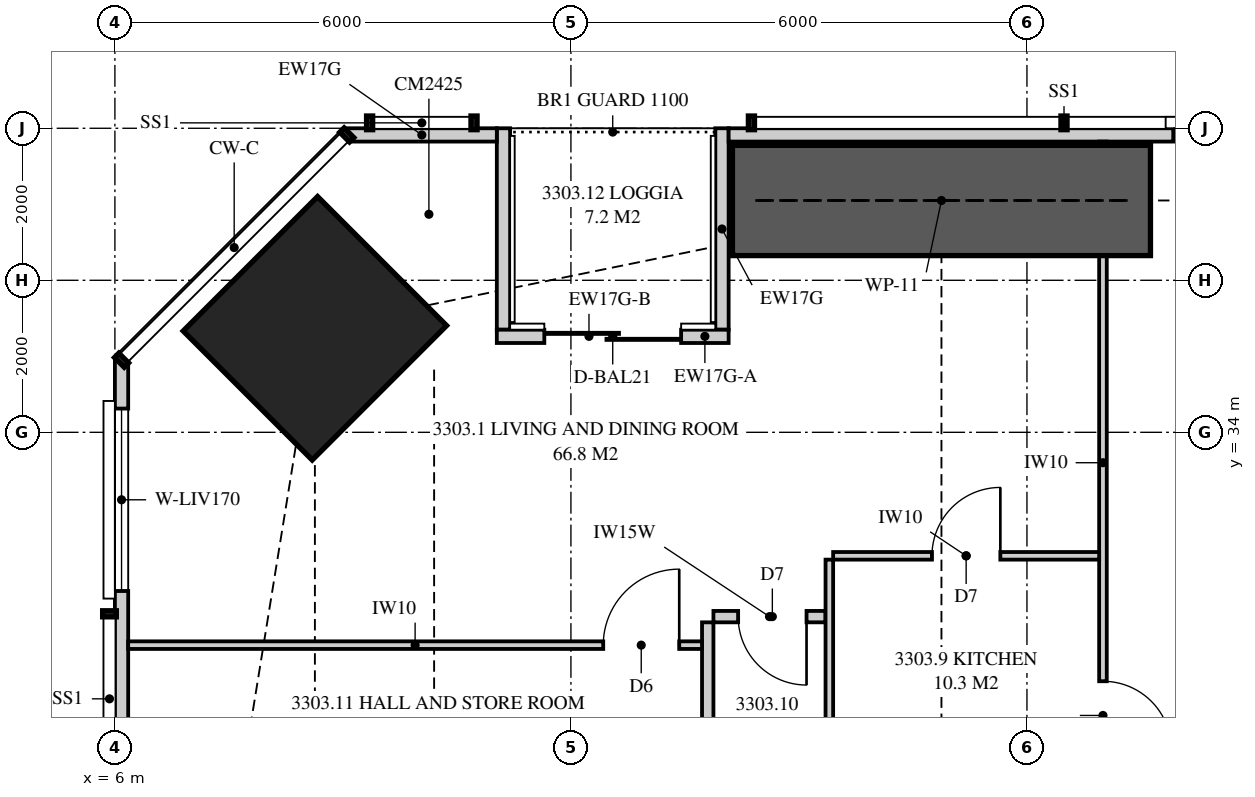
"""IFC4 building model, lengths in metres.
Left out: names, types, materials, properties, quantities, classifications, styles, units other than length and angle.
Written with IfcOpenShell. Run it as: python <this file> out.ifc"""

import sys

from ifc_helpers import new_model, si_unit, direction, frame, frame_2d, origin, origin_2d, place, context, subcontext, project, spatial, polyline, rectangle, outline, extrude, element, fill, save


model = new_model("IFC4")
c1 = context("Model", 3, precision=1e-05, world=origin(), true_north=direction((0.0, 1.0)))
c2 = subcontext(c1, "Body", "Model", "MODEL_VIEW")
j1 = project(units=[si_unit("LENGTHUNIT", "METRE"), si_unit("PLANEANGLEUNIT", "RADIAN")], contexts=[c1])
p1 = place(None, origin())
s1 = spatial("IfcSite", under=j1, at=p1, CompositionType="ELEMENT")
p2 = place(p1, origin())
s2 = spatial("IfcBuilding", under=s1, at=p2, CompositionType="ELEMENT")
p3 = place(p2, frame((0.0, 0.0, 121.6)))
s3 = spatial("IfcBuildingStorey", under=s2, at=p3, CompositionType="ELEMENT", Elevation=121.6)
p4 = place(p3, frame((8.631, 35.369, 0.0), z_axis=(0.0, 0.0, 1.0), x_axis=(0.707106781187, -0.707106781187, 0.0)))
e1 = element("IfcColumn", 1, at=p4, inside=s3, PredefinedType="COLUMN", context=c2, shape_type="SweptSolid", body=[
    extrude(rectangle(XDim=2.4, YDim=2.5, at=origin_2d()), origin(), (0.0, 0.0, 1.0), 3.35),
])
p5 = place(p3, frame((41.449, 37.913, 0.0), z_axis=(0.0, 0.0, 1.0), x_axis=(-1.0, 0.0, 0.0)))
e2 = element("IfcWall", 2, at=p5, inside=s3, PredefinedType="SOLIDWALL", context=c2, shape_type="SweptSolid", body=[
    extrude(outline(polyline([(0.0, 0.0), (27.374, 0.0), (27.374, 3.11), (24.777, 3.11), (24.777, 2.15), (24.732, 2.15), (24.732, 3.11), (24.574, 3.11), (24.574, 2.15), (2.824, 2.15), (2.824, 3.11), (2.666, 3.11), (2.666, 2.15), (2.62, 2.15), (2.62, 3.11), (0.0, 3.11), (0.0, 0.0)])), frame((0.0, 0.087, 0.0), z_axis=(0.0, -1.0, 0.0), x_axis=(1.0, 0.0, 0.0)), (0.0, 0.0, 1.0), 0.175),
])
p6 = place(p5, frame((5.699, 0.0, 0.4)))
e3 = element("IfcOpeningElement", 3, at=p6, cuts=e2, PredefinedType="OPENING", context=c2, shape_type="SweptSolid", body=[
    extrude(rectangle(XDim=1.8, YDim=1.7, at=frame_2d((0.9, 0.85))), frame((0.0, 0.097, 0.0), z_axis=(0.0, -1.0, 0.0), x_axis=(1.0, 0.0, 0.0)), (0.0, 0.0, 1.0), 0.195),
])
p7 = place(p5, frame((9.034, 0.0, 0.4)))
e4 = element("IfcOpeningElement", 4, at=p7, cuts=e2, PredefinedType="OPENING", context=c2, shape_type="SweptSolid", body=[
    extrude(rectangle(XDim=1.8, YDim=1.7, at=frame_2d((0.9, 0.85))), frame((0.0, 0.097, 0.0), z_axis=(0.0, -1.0, 0.0), x_axis=(1.0, 0.0, 0.0)), (0.0, 0.0, 1.0), 0.195),
])
p8 = place(p5, frame((16.558, 0.0, 0.4)))
e5 = element("IfcOpeningElement", 5, at=p8, cuts=e2, PredefinedType="OPENING", context=c2, shape_type="SweptSolid", body=[
    extrude(rectangle(XDim=1.8, YDim=1.7, at=frame_2d((0.9, 0.85))), frame((0.0, 0.097, 0.0), z_axis=(0.0, -1.0, 0.0), x_axis=(1.0, 0.0, 0.0)), (0.0, 0.0, 1.0), 0.195),
])
p9 = place(p5, frame((19.724, 0.0, 0.4)))
e6 = element("IfcOpeningElement", 6, at=p9, cuts=e2, PredefinedType="OPENING", context=c2, shape_type="SweptSolid", body=[
    extrude(rectangle(XDim=1.8, YDim=1.7, at=frame_2d((0.9, 0.85))), frame((0.0, 0.097, 0.0), z_axis=(0.0, -1.0, 0.0), x_axis=(1.0, 0.0, 0.0)), (0.0, 0.0, 1.0), 0.195),
])
p10 = place(p3, frame((11.025, 37.913, 0.0), z_axis=(0.0, 0.0, 1.0), x_axis=(-1.0, 0.0, 0.0)))
e7 = element("IfcWall", 7, at=p10, inside=s3, PredefinedType="SOLIDWALL", context=c2, shape_type="SweptSolid", body=[
    extrude(rectangle(XDim=1.974, YDim=0.175, at=frame_2d((0.987, 0.0))), origin(), (0.0, 0.0, 1.0), 3.11),
])
p11 = place(p3, frame((14.075, 35.262, 0.0), z_axis=(0.0, 0.0, 1.0), x_axis=(-1.0, 0.0, 0.0)))
e8 = element("IfcWall", 8, at=p11, inside=s3, PredefinedType="SOLIDWALL", context=c2, shape_type="SweptSolid", body=[
    extrude(rectangle(XDim=0.625, YDim=0.175, at=frame_2d((0.312, 0.0))), origin(), (0.0, 0.0, 1.0), 3.11),
])
p12 = place(p3, frame((13.45, 35.262, 0.0), z_axis=(0.0, 0.0, 1.0), x_axis=(-1.0, 0.0, 0.0)))
e9 = element("IfcWall", 9, at=p12, inside=s3, PredefinedType="SOLIDWALL", context=c2, shape_type="SweptSolid", body=[
    extrude(rectangle(XDim=2.425, YDim=0.175, at=frame_2d((1.212, 0.0))), origin(), (0.0, 0.0, 1.0), 2.15),
])
p13 = place(p12, origin())
e10 = element("IfcOpeningElement", 10, at=p13, cuts=e9, PredefinedType="OPENING", context=c2, shape_type="SweptSolid", body=[
    extrude(rectangle(XDim=1.8, YDim=2.1, at=frame_2d((0.9, 1.05))), frame((0.0, 0.097, 0.0), z_axis=(0.0, -1.0, 0.0), x_axis=(1.0, 0.0, 0.0)), (0.0, 0.0, 1.0), 0.195),
])
p14 = place(p3, frame((13.988, 38.0, 0.0), z_axis=(0.0, 0.0, 1.0), x_axis=(0.0, -1.0, 0.0)))
e11 = element("IfcWall", 11, at=p14, inside=s3, PredefinedType="SOLIDWALL", context=c2, shape_type="SweptSolid", body=[
    extrude(outline(polyline([(0.0, 0.0), (2.65, 0.0), (2.65, 3.11), (2.373, 3.11), (2.373, 2.15), (0.705, 2.15), (0.705, 3.11), (0.0, 3.11), (0.0, 0.0)])), frame((0.0, 0.087, 0.0), z_axis=(0.0, -1.0, 0.0), x_axis=(1.0, 0.0, 0.0)), (0.0, 0.0, 1.0), 0.175),
])
p15 = place(p3, frame((11.113, 38.0, 0.0), z_axis=(0.0, 0.0, 1.0), x_axis=(0.0, -1.0, 0.0)))
e12 = element("IfcWall", 12, at=p15, inside=s3, PredefinedType="SOLIDWALL", context=c2, shape_type="SweptSolid", body=[
    extrude(outline(polyline([(0.0, 0.0), (2.65, 0.0), (2.65, 2.15), (1.291, 2.15), (1.291, 3.11), (0.0, 3.11), (0.0, 0.0)])), frame((0.0, 0.087, 0.0), z_axis=(0.0, -1.0, 0.0), x_axis=(1.0, 0.0, 0.0)), (0.0, 0.0, 1.0), 0.175),
])
p16 = place(p3, frame((6.087, 34.949, 0.0), z_axis=(0.0, 0.0, 1.0), x_axis=(0.0, -1.0, 0.0)))
e13 = element("IfcWall", 13, at=p16, inside=s3, PredefinedType="SOLIDWALL", context=c2, shape_type="SweptSolid", body=[
    extrude(outline(polyline([(0.0, 0.0), (14.532, 0.0), (14.532, 2.15), (9.949, 2.15), (9.949, 3.11), (9.823, 3.11), (9.823, 2.15), (9.73, 2.15), (9.73, 3.11), (0.0, 3.11), (0.0, 0.0)])), frame((0.0, 0.087, 0.0), z_axis=(0.0, -1.0, 0.0), x_axis=(1.0, 0.0, 0.0)), (0.0, 0.0, 1.0), 0.175),
])
p17 = place(p16, frame((0.636, 0.0, 0.4)))
e14 = element("IfcOpeningElement", 14, at=p17, cuts=e13, PredefinedType="OPENING", context=c2, shape_type="SweptSolid", body=[
    extrude(rectangle(XDim=2.4, YDim=1.7, at=frame_2d((1.2, 0.85))), frame((0.0, 0.097, 0.0), z_axis=(0.0, -1.0, 0.0), x_axis=(1.0, 0.0, 0.0)), (0.0, 0.0, 1.0), 0.195),
])
p18 = place(p16, frame((5.874, 0.0, 0.4)))
e15 = element("IfcOpeningElement", 15, at=p18, cuts=e13, PredefinedType="OPENING", context=c2, shape_type="SweptSolid", body=[
    extrude(rectangle(XDim=1.2, YDim=1.7, at=frame_2d((0.6, 0.85))), frame((0.0, 0.097, 0.0), z_axis=(0.0, -1.0, 0.0), x_axis=(1.0, 0.0, 0.0)), (0.0, 0.0, 1.0), 0.195),
])
p19 = place(p3, frame((19.0, 37.825, 0.0), z_axis=(0.0, 0.0, 1.0), x_axis=(0.0, -1.0, 0.0)))
e16 = element("IfcWall", 16, at=p19, inside=s3, PredefinedType="PARTITIONING", context=c2, shape_type="SweptSolid", body=[
    extrude(outline(polyline([(0.529, 2.15), (0.0, 2.15), (0.0, 0.0), (0.529, 0.0), (0.529, 0.017), (1.021, 0.017), (1.021, 0.0), (8.45, 0.0), (8.45, 3.11), (1.635, 3.11), (1.635, 2.15), (1.021, 2.15), (1.021, 2.133), (0.529, 2.133), (0.529, 2.15)])), frame((0.0, 0.05, 0.0), z_axis=(0.0, -1.0, 0.0), x_axis=(1.0, 0.0, 0.0)), (0.0, 0.0, 1.0), 0.1),
])
p20 = place(p19, frame((7.1, 0.0, 0.0)))
e17 = element("IfcOpeningElement", 17, at=p20, cuts=e16, PredefinedType="OPENING", context=c2, shape_type="SweptSolid", body=[
    extrude(rectangle(XDim=0.9, YDim=2.1, at=frame_2d((0.45, 1.05))), frame((0.0, 0.06, 0.0), z_axis=(0.0, -1.0, 0.0), x_axis=(1.0, 0.0, 0.0)), (0.0, 0.0, 1.0), 0.12),
])
p21 = place(p3, frame((15.45, 32.375, 0.0), z_axis=(0.0, 0.0, 1.0), x_axis=(1.0, 0.0, 0.0)))
e18 = element("IfcWall", 18, at=p21, inside=s3, PredefinedType="PARTITIONING", context=c2, shape_type="SweptSolid", body=[
    extrude(outline(polyline([(0.0, 0.0), (3.5, 0.0), (3.5, 3.11), (1.712, 3.11), (1.712, 2.541), (1.138, 2.541), (1.138, 3.11), (0.0, 3.11), (0.0, 0.0)])), frame((0.0, 0.05, 0.0), z_axis=(0.0, -1.0, 0.0), x_axis=(1.0, 0.0, 0.0)), (0.0, 0.0, 1.0), 0.1),
])
p22 = place(p21, frame((1.3, 0.0, 0.0)))
e19 = element("IfcOpeningElement", 19, at=p22, cuts=e18, PredefinedType="OPENING", context=c2, shape_type="SweptSolid", body=[
    extrude(rectangle(XDim=0.9, YDim=2.1, at=frame_2d((0.45, 1.05))), frame((0.0, 0.06, 0.0), z_axis=(0.0, -1.0, 0.0), x_axis=(1.0, 0.0, 0.0)), (0.0, 0.0, 1.0), 0.12),
])
p23 = place(p3, frame((15.4, 32.325, 0.0), z_axis=(0.0, 0.0, 1.0), x_axis=(0.0, -1.0, 0.0)))
e20 = element("IfcWall", 20, at=p23, inside=s3, PredefinedType="PARTITIONING", context=c2, shape_type="SweptSolid", body=[
    extrude(rectangle(XDim=2.95, YDim=0.1, at=frame_2d((1.475, 0.0))), origin(), (0.0, 0.0, 1.0), 3.11),
])
p24 = place(p3, frame((13.875, 31.575, 0.0), z_axis=(0.0, 0.0, 1.0), x_axis=(1.0, 0.0, 0.0)))
e21 = element("IfcWall", 21, at=p24, inside=s3, PredefinedType="PLUMBINGWALL", context=c2, shape_type="SweptSolid", body=[
    extrude(rectangle(XDim=1.475, YDim=0.15, at=frame_2d((0.738, 0.0))), origin(), (0.0, 0.0, 1.0), 3.11),
])
p25 = place(p24, frame((0.325, 0.0, 0.0)))
e22 = element("IfcOpeningElement", 22, at=p25, cuts=e21, PredefinedType="OPENING", context=c2, shape_type="SweptSolid", body=[
    extrude(rectangle(XDim=0.9, YDim=2.1, at=frame_2d((0.45, 1.05))), frame((0.0, 0.085, 0.0), z_axis=(0.0, -1.0, 0.0), x_axis=(1.0, 0.0, 0.0)), (0.0, 0.0, 1.0), 0.17),
])
p26 = place(p3, frame((13.8, 31.5, 0.0), z_axis=(0.0, 0.0, 1.0), x_axis=(0.0, -1.0, 0.0)))
e23 = element("IfcWall", 23, at=p26, inside=s3, PredefinedType="PLUMBINGWALL", context=c2, shape_type="SweptSolid", body=[
    extrude(rectangle(XDim=2.125, YDim=0.15, at=frame_2d((1.062, 0.0))), origin(), (0.0, 0.0, 1.0), 3.11),
])
p27 = place(p3, frame((6.175, 31.2, 0.0), z_axis=(0.0, 0.0, 1.0), x_axis=(1.0, 0.0, 0.0)))
e24 = element("IfcWall", 24, at=p27, inside=s3, PredefinedType="PARTITIONING", context=c2, shape_type="SweptSolid", body=[
    extrude(outline(polyline([(0.0, 0.0), (7.55, 0.0), (7.55, 3.11), (5.285, 3.11), (5.285, 2.51), (2.765, 2.51), (2.765, 3.11), (2.744, 3.11), (2.744, 2.541), (2.652, 2.541), (2.652, 2.15), (0.909, 2.15), (0.909, 3.11), (0.0, 3.11), (0.0, 0.0)])), frame((0.0, 0.05, 0.0), z_axis=(0.0, -1.0, 0.0), x_axis=(1.0, 0.0, 0.0)), (0.0, 0.0, 1.0), 0.1),
])
p28 = place(p27, frame((6.25, 0.0, 0.0)))
e25 = element("IfcOpeningElement", 25, at=p28, cuts=e24, PredefinedType="OPENING", context=c2, shape_type="SweptSolid", body=[
    extrude(rectangle(XDim=1.0, YDim=2.1, at=frame_2d((0.5, 1.05))), frame((0.0, 0.06, 0.0), z_axis=(0.0, -1.0, 0.0), x_axis=(1.0, 0.0, 0.0)), (0.0, 0.0, 1.0), 0.12),
])
p29 = place(p3, frame((14.125, 37.05, 0.0), z_axis=(0.0, 0.0, 1.0), x_axis=(1.0, 0.0, 0.0)))
e26 = element("IfcWall", 26, at=p29, inside=s3, PredefinedType="SHEAR", context=c2, shape_type="SweptSolid", body=[
    extrude(rectangle(XDim=5.5, YDim=1.45, at=frame_2d((2.75, 0.0))), origin(), (0.0, 0.0, 1.0), 3.35),
])
p30 = place(p9, origin())
e27 = element("IfcWindow", 27, at=p30, inside=s3, PartitioningType="SINGLE_PANEL", PredefinedType="WINDOW", context=c2, shape_type="SweptSolid", body=[
    extrude(rectangle(XDim=1.8, YDim=1.7, at=frame_2d((0.9, 0.85))), frame((0.0, 0.03, 0.0), z_axis=(0.0, -1.0, 0.0), x_axis=(1.0, 0.0, 0.0)), (0.0, 0.0, 1.0), 0.06),
])
fill(e6, e27)
p31 = place(p13, origin())
e28 = element("IfcDoor", 28, at=p31, inside=s3, OperationType="SLIDING_TO_LEFT", PredefinedType="DOOR", context=c2, shape_type="SweptSolid", body=[
    extrude(rectangle(XDim=1.8, YDim=2.1, at=frame_2d((0.9, 1.05))), frame((0.0, 0.025, 0.0), z_axis=(0.0, -1.0, 0.0), x_axis=(1.0, 0.0, 0.0)), (0.0, 0.0, 1.0), 0.05),
])
fill(e10, e28)
p32 = place(p17, origin())
e29 = element("IfcWindow", 29, at=p32, inside=s3, PartitioningType="SINGLE_PANEL", PredefinedType="WINDOW", context=c2, shape_type="SweptSolid", body=[
    extrude(rectangle(XDim=2.4, YDim=1.7, at=frame_2d((1.2, 0.85))), frame((0.0, 0.03, 0.0), z_axis=(0.0, -1.0, 0.0), x_axis=(1.0, 0.0, 0.0)), (0.0, 0.0, 1.0), 0.06),
])
fill(e14, e29)
p33 = place(p20, origin())
e30 = element("IfcDoor", 30, at=p33, inside=s3, OperationType="SINGLE_SWING_RIGHT", PredefinedType="DOOR", context=c2, shape_type="SweptSolid", body=[
    extrude(rectangle(XDim=0.9, YDim=2.1, at=frame_2d((0.45, 1.05))), frame((0.0, 0.025, 0.0), z_axis=(0.0, -1.0, 0.0), x_axis=(1.0, 0.0, 0.0)), (0.0, 0.0, 1.0), 0.05),
])
fill(e17, e30)
p34 = place(p22, origin())
e31 = element("IfcDoor", 31, at=p34, inside=s3, OperationType="SINGLE_SWING_RIGHT", PredefinedType="DOOR", context=c2, shape_type="SweptSolid", body=[
    extrude(rectangle(XDim=0.9, YDim=2.1, at=frame_2d((0.45, 1.05))), frame((0.0, 0.025, 0.0), z_axis=(0.0, -1.0, 0.0), x_axis=(1.0, 0.0, 0.0)), (0.0, 0.0, 1.0), 0.05),
])
fill(e19, e31)
p35 = place(p25, frame((0.9, 0.0, 0.0), z_axis=(0.0, 0.0, 1.0), x_axis=(-1.0, 0.0, 0.0)))
e32 = element("IfcDoor", 32, at=p35, inside=s3, OperationType="SINGLE_SWING_LEFT", PredefinedType="DOOR", context=c2, shape_type="SweptSolid", body=[
    extrude(rectangle(XDim=0.9, YDim=2.1, at=frame_2d((0.45, 1.05))), frame((0.0, 0.025, 0.0), z_axis=(0.0, -1.0, 0.0), x_axis=(1.0, 0.0, 0.0)), (0.0, 0.0, 1.0), 0.05),
])
fill(e22, e32)
p36 = place(p28, origin())
e33 = element("IfcDoor", 33, at=p36, inside=s3, OperationType="SINGLE_SWING_RIGHT", PredefinedType="DOOR", context=c2, shape_type="SweptSolid", body=[
    extrude(rectangle(XDim=1.0, YDim=2.1, at=frame_2d((0.5, 1.05))), frame((0.0, 0.025, 0.0), z_axis=(0.0, -1.0, 0.0), x_axis=(1.0, 0.0, 0.0)), (0.0, 0.0, 1.0), 0.05),
])
fill(e25, e33)
save(model, sys.argv[1])
